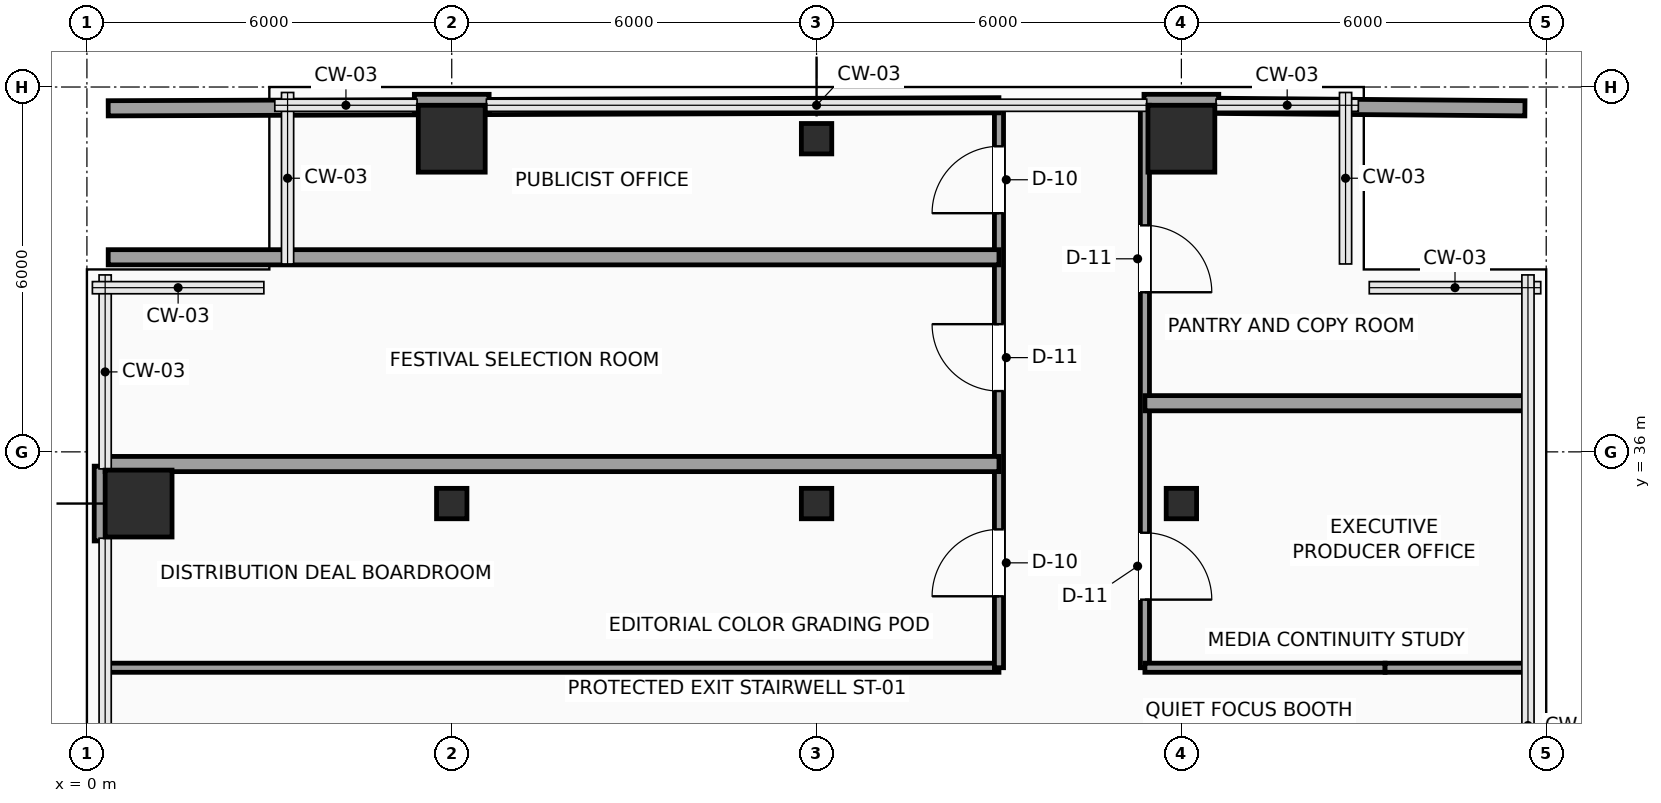
"""IFC4 building model, lengths in metres.
Left out: names, types, materials, properties, quantities, classifications, styles, units other than length and angle.
Written with IfcOpenShell. Run it as: python <this file> out.ifc"""

import sys

from ifc_helpers import new_model, si_unit, direction, frame, frame_2d, origin, origin_2d, place, context, subcontext, project, spatial, rectangle, hollow_rectangle, extrude, element, fill, save


model = new_model("IFC4")
c1 = context("Model", 3, precision=1e-05, world=origin(), true_north=direction((0.0, 1.0)))
c2 = subcontext(c1, "Body", "Model", "MODEL_VIEW")
j1 = project(units=[si_unit("LENGTHUNIT", "METRE"), si_unit("PLANEANGLEUNIT", "RADIAN")], contexts=[c1])
p1 = place(None, origin())
s1 = spatial("IfcSite", under=j1, at=p1, CompositionType="ELEMENT")
p2 = place(p1, origin())
s2 = spatial("IfcBuilding", under=s1, at=p2, CompositionType="ELEMENT")
p3 = place(p2, frame((0.0, 0.0, 130.65)))
s3 = spatial("IfcBuildingStorey", under=s2, at=p3, CompositionType="ELEMENT", Elevation=130.65)
p4 = place(p3, frame((0.85, 35.15, 0.0), z_axis=(0.0, 0.0, 1.0), x_axis=(1.0, 0.0, 0.0)))
e1 = element("IfcColumn", 1, at=p4, inside=s3, PredefinedType="COLUMN", context=c2, shape_type="SweptSolid", body=[
    extrude(rectangle(XDim=1.1, YDim=1.1, at=origin_2d()), origin(), (0.0, 0.0, 1.0), 3.75),
])
p5 = place(p3, frame((6.0, 35.15, 0.0), z_axis=(0.0, 0.0, 1.0), x_axis=(1.0, 0.0, 0.0)))
e2 = element("IfcColumn", 2, at=p5, inside=s3, PredefinedType="COLUMN", context=c2, shape_type="SweptSolid", body=[
    extrude(hollow_rectangle(XDim=0.5, YDim=0.5, WallThickness=0.025, InnerFilletRadius=0.025, OuterFilletRadius=0.04, at=origin_2d()), origin(), (0.0, 0.0, 1.0), 3.75),
])
p6 = place(p3, frame((6.0, 41.15, 0.0), z_axis=(0.0, 0.0, 1.0), x_axis=(1.0, 0.0, 0.0)))
e3 = element("IfcColumn", 3, at=p6, inside=s3, PredefinedType="COLUMN", context=c2, shape_type="SweptSolid", body=[
    extrude(rectangle(XDim=1.1, YDim=1.1, at=origin_2d()), origin(), (0.0, 0.0, 1.0), 3.75),
])
for number, where, z_axis, x_axis in (
    (4, (12.0, 35.15, 0.0), (0.0, 0.0, 1.0), (1.0, 0.0, 0.0)),
    (5, (12.0, 41.15, 0.0), (0.0, 0.0, 1.0), (1.0, 0.0, 0.0)),
    (6, (18.0, 35.15, 0.0), (0.0, 0.0, 1.0), (1.0, 0.0, 0.0)),
):
    element("IfcColumn", number, at=place(p3, frame(where, z_axis=z_axis, x_axis=x_axis)), inside=s3, PredefinedType="COLUMN", context=c2, shape_type="SweptSolid", body=[
        extrude(hollow_rectangle(XDim=0.5, YDim=0.5, WallThickness=0.025, InnerFilletRadius=0.025, OuterFilletRadius=0.04, at=origin_2d()), origin(), (0.0, 0.0, 1.0), 3.75),
    ])
p7 = place(p3, frame((18.0, 41.15, 0.0), z_axis=(0.0, 0.0, 1.0), x_axis=(1.0, 0.0, 0.0)))
e7 = element("IfcColumn", 7, at=p7, inside=s3, PredefinedType="COLUMN", context=c2, shape_type="SweptSolid", body=[
    extrude(rectangle(XDim=1.1, YDim=1.1, at=origin_2d()), origin(), (0.0, 0.0, 1.0), 3.75),
])
for number, where, z_axis, x_axis in (
    (8, (0.24, 34.535, 0.0), (0.0, 0.0, 1.0), (0.0, 1.0, 0.0)),
    (9, (5.385, 41.76, 0.0), (0.0, 0.0, 1.0), (1.0, 0.0, 0.0)),
    (10, (17.385, 41.76, 0.0), (0.0, 0.0, 1.0), (1.0, 0.0, 0.0)),
):
    element("IfcWall", number, at=place(p3, frame(where, z_axis=z_axis, x_axis=x_axis)), inside=s3, PredefinedType="SOLIDWALL", context=c2, shape_type="SweptSolid", body=[
        extrude(rectangle(XDim=1.23, YDim=0.24, at=frame_2d((0.615, 0.0))), origin(), (0.0, 0.0, 1.0), 3.525),
    ])
p8 = place(p3, frame((0.3, 32.45, 0.0), z_axis=(0.0, 0.0, 1.0), x_axis=(1.0, 0.0, 0.0)))
e11 = element("IfcWall", 11, at=p8, inside=s3, PredefinedType="PARTITIONING", context=c2, shape_type="SweptSolid", body=[
    extrude(rectangle(XDim=14.7, YDim=0.15, at=frame_2d((7.35, 0.0))), origin(), (0.0, 0.0, 1.0), 3.525),
])
p9 = place(p3, frame((15.0, 32.45, 0.0), z_axis=(0.0, 0.0, 1.0), x_axis=(0.0, 1.0, 0.0)))
e12 = element("IfcWall", 12, at=p9, inside=s3, PredefinedType="PARTITIONING", context=c2, shape_type="SweptSolid", body=[
    extrude(rectangle(XDim=9.25, YDim=0.15, at=frame_2d((4.625, 0.0))), origin(), (0.0, 0.0, 1.0), 3.525),
])
p10 = place(p9, frame((1.175, 0.0, 0.0)))
e13 = element("IfcOpeningElement", 13, at=p10, cuts=e12, PredefinedType="OPENING", context=c2, shape_type="SweptSolid", body=[
    extrude(rectangle(XDim=1.1, YDim=2.25, at=frame_2d((0.55, 1.125))), frame((0.0, 0.085, 0.0), z_axis=(0.0, -1.0, 0.0), x_axis=(1.0, 0.0, 0.0)), (0.0, 0.0, 1.0), 0.17),
])
p11 = place(p9, frame((4.55, 0.0, 0.0)))
e14 = element("IfcOpeningElement", 14, at=p11, cuts=e12, PredefinedType="OPENING", context=c2, shape_type="SweptSolid", body=[
    extrude(rectangle(XDim=1.1, YDim=2.25, at=frame_2d((0.55, 1.125))), frame((0.0, 0.085, 0.0), z_axis=(0.0, -1.0, 0.0), x_axis=(1.0, 0.0, 0.0)), (0.0, 0.0, 1.0), 0.17),
])
p12 = place(p9, frame((7.475, 0.0, 0.0)))
e15 = element("IfcOpeningElement", 15, at=p12, cuts=e12, PredefinedType="OPENING", context=c2, shape_type="SweptSolid", body=[
    extrude(rectangle(XDim=1.1, YDim=2.25, at=frame_2d((0.55, 1.125))), frame((0.0, 0.085, 0.0), z_axis=(0.0, -1.0, 0.0), x_axis=(1.0, 0.0, 0.0)), (0.0, 0.0, 1.0), 0.17),
])
p13 = place(p3, frame((17.4, 41.7, 0.0), z_axis=(0.0, 0.0, 1.0), x_axis=(0.0, -1.0, 0.0)))
e16 = element("IfcWall", 16, at=p13, inside=s3, PredefinedType="PARTITIONING", context=c2, shape_type="SweptSolid", body=[
    extrude(rectangle(XDim=9.25, YDim=0.15, at=frame_2d((4.625, 0.0))), origin(), (0.0, 0.0, 1.0), 3.525),
])
p14 = place(p13, frame((7.03, 0.0, 0.0)))
e17 = element("IfcOpeningElement", 17, at=p14, cuts=e16, PredefinedType="OPENING", context=c2, shape_type="SweptSolid", body=[
    extrude(rectangle(XDim=1.1, YDim=2.25, at=frame_2d((0.55, 1.125))), frame((0.0, 0.085, 0.0), z_axis=(0.0, -1.0, 0.0), x_axis=(1.0, 0.0, 0.0)), (0.0, 0.0, 1.0), 0.17),
])
p15 = place(p13, frame((1.975, 0.0, 0.0)))
e18 = element("IfcOpeningElement", 18, at=p15, cuts=e16, PredefinedType="OPENING", context=c2, shape_type="SweptSolid", body=[
    extrude(rectangle(XDim=1.1, YDim=2.25, at=frame_2d((0.55, 1.125))), frame((0.0, 0.085, 0.0), z_axis=(0.0, -1.0, 0.0), x_axis=(1.0, 0.0, 0.0)), (0.0, 0.0, 1.0), 0.17),
])
p16 = place(p3, frame((17.4, 32.45, 0.0), z_axis=(0.0, 0.0, 1.0), x_axis=(1.0, 0.0, 0.0)))
e19 = element("IfcWall", 19, at=p16, inside=s3, PredefinedType="PARTITIONING", context=c2, shape_type="SweptSolid", body=[
    extrude(rectangle(XDim=3.95, YDim=0.15, at=frame_2d((1.975, 0.0))), origin(), (0.0, 0.0, 1.0), 3.525),
])
p17 = place(p3, frame((21.35, 32.45, 0.0), z_axis=(0.0, 0.0, 1.0), x_axis=(1.0, 0.0, 0.0)))
e20 = element("IfcWall", 20, at=p17, inside=s3, PredefinedType="PARTITIONING", context=c2, shape_type="SweptSolid", body=[
    extrude(rectangle(XDim=2.35, YDim=0.15, at=frame_2d((1.175, 0.0))), origin(), (0.0, 0.0, 1.0), 3.525),
])
p18 = place(p3, frame((0.3, 35.8, 0.0), z_axis=(0.0, 0.0, 1.0), x_axis=(1.0, 0.0, 0.0)))
e21 = element("IfcWall", 21, at=p18, inside=s3, PredefinedType="PARTITIONING", context=c2, shape_type="SweptSolid", body=[
    extrude(rectangle(XDim=14.7, YDim=0.25, at=frame_2d((7.35, 0.0))), origin(), (0.0, 0.0, 1.0), 3.525),
])
p19 = place(p3, frame((0.35, 39.2, 0.0), z_axis=(0.0, 0.0, 1.0), x_axis=(1.0, 0.0, 0.0)))
e22 = element("IfcWall", 22, at=p19, inside=s3, PredefinedType="PARTITIONING", context=c2, shape_type="SweptSolid", body=[
    extrude(rectangle(XDim=14.65, YDim=0.25, at=frame_2d((7.325, 0.0))), origin(), (0.0, 0.0, 1.0), 3.525),
])
p20 = place(p3, frame((0.35, 41.65, 0.0), z_axis=(0.0, 0.0, 1.0), x_axis=(0.999994073761, 0.003442737683, 0.0)))
e23 = element("IfcWall", 23, at=p20, inside=s3, PredefinedType="PARTITIONING", context=c2, shape_type="SweptSolid", body=[
    extrude(rectangle(XDim=5.035, YDim=0.25, at=frame_2d((2.518, 0.0))), origin(), (0.0, 0.0, 1.0), 3.525),
])
p21 = place(p3, frame((6.615, 41.671, 0.0), z_axis=(0.0, 0.0, 1.0), x_axis=(0.999994197557, 0.003406589638, 0.0)))
e24 = element("IfcWall", 24, at=p21, inside=s3, PredefinedType="PARTITIONING", context=c2, shape_type="SweptSolid", body=[
    extrude(rectangle(XDim=8.385, YDim=0.25, at=frame_2d((4.192, 0.0))), origin(), (0.0, 0.0, 1.0), 3.525),
])
p22 = place(p3, frame((17.4, 36.8, 0.0), z_axis=(0.0, 0.0, 1.0), x_axis=(1.0, 0.0, 0.0)))
e25 = element("IfcWall", 25, at=p22, inside=s3, PredefinedType="PARTITIONING", context=c2, shape_type="SweptSolid", body=[
    extrude(rectangle(XDim=6.3, YDim=0.25, at=frame_2d((3.15, 0.0))), origin(), (0.0, 0.0, 1.0), 3.525),
])
p23 = place(p3, frame((18.615, 41.69, 0.0), z_axis=(0.0, 0.0, 1.0), x_axis=(0.99996799533, -0.008000519771, 0.0)))
e26 = element("IfcWall", 26, at=p23, inside=s3, PredefinedType="PARTITIONING", context=c2, shape_type="SweptSolid", body=[
    extrude(rectangle(XDim=5.035, YDim=0.25, at=frame_2d((2.518, 0.0))), origin(), (0.0, 0.0, 1.0), 3.525),
])
p24 = place(p10, origin())
e27 = element("IfcDoor", 27, at=p24, inside=s3, OperationType="SINGLE_SWING_LEFT", PredefinedType="DOOR", context=c2, shape_type="SweptSolid", body=[
    extrude(rectangle(XDim=1.1, YDim=2.25, at=frame_2d((0.55, 1.125))), frame((0.0, 0.025, 0.0), z_axis=(0.0, -1.0, 0.0), x_axis=(1.0, 0.0, 0.0)), (0.0, 0.0, 1.0), 0.05),
])
fill(e13, e27)
p25 = place(p11, origin())
e28 = element("IfcDoor", 28, at=p25, inside=s3, OperationType="SINGLE_SWING_RIGHT", PredefinedType="DOOR", context=c2, shape_type="SweptSolid", body=[
    extrude(rectangle(XDim=1.1, YDim=2.25, at=frame_2d((0.55, 1.125))), frame((0.0, 0.025, 0.0), z_axis=(0.0, -1.0, 0.0), x_axis=(1.0, 0.0, 0.0)), (0.0, 0.0, 1.0), 0.05),
])
fill(e14, e28)
p26 = place(p12, origin())
e29 = element("IfcDoor", 29, at=p26, inside=s3, OperationType="SINGLE_SWING_LEFT", PredefinedType="DOOR", context=c2, shape_type="SweptSolid", body=[
    extrude(rectangle(XDim=1.1, YDim=2.25, at=frame_2d((0.55, 1.125))), frame((0.0, 0.025, 0.0), z_axis=(0.0, -1.0, 0.0), x_axis=(1.0, 0.0, 0.0)), (0.0, 0.0, 1.0), 0.05),
])
fill(e15, e29)
p27 = place(p14, origin())
e30 = element("IfcDoor", 30, at=p27, inside=s3, OperationType="SINGLE_SWING_RIGHT", PredefinedType="DOOR", context=c2, shape_type="SweptSolid", body=[
    extrude(rectangle(XDim=1.1, YDim=2.25, at=frame_2d((0.55, 1.125))), frame((0.0, 0.025, 0.0), z_axis=(0.0, -1.0, 0.0), x_axis=(1.0, 0.0, 0.0)), (0.0, 0.0, 1.0), 0.05),
])
fill(e17, e30)
p28 = place(p15, origin())
e31 = element("IfcDoor", 31, at=p28, inside=s3, OperationType="SINGLE_SWING_RIGHT", PredefinedType="DOOR", context=c2, shape_type="SweptSolid", body=[
    extrude(rectangle(XDim=1.1, YDim=2.25, at=frame_2d((0.55, 1.125))), frame((0.0, 0.025, 0.0), z_axis=(0.0, -1.0, 0.0), x_axis=(1.0, 0.0, 0.0)), (0.0, 0.0, 1.0), 0.05),
])
fill(e18, e31)
save(model, sys.argv[1])
